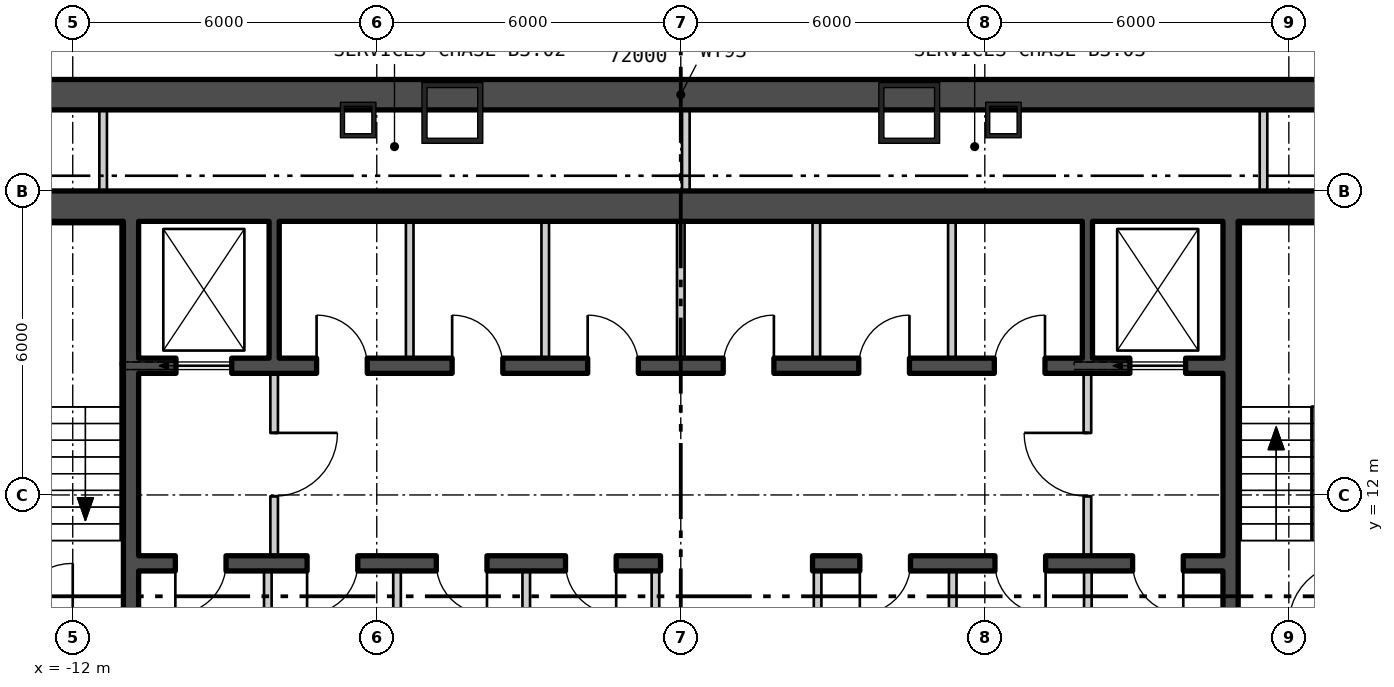
"""IFC4 building model, lengths in metres.
Left out: names, types, materials, properties, quantities, classifications, styles, units other than length and angle.
Written with IfcOpenShell. Run it as: python <this file> out.ifc"""

import sys

from ifc_helpers import new_model, si_unit, direction, frame, frame_2d, origin, origin_2d, place, context, subcontext, project, spatial, rectangle, hollow_rectangle, extrude, element, fill, save


model = new_model("IFC4")
c1 = context("Model", 3, precision=1e-05, world=origin(), true_north=direction((0.0, 1.0)))
c2 = subcontext(c1, "Body", "Model", "MODEL_VIEW")
j1 = project(units=[si_unit("LENGTHUNIT", "METRE"), si_unit("PLANEANGLEUNIT", "RADIAN")], contexts=[c1])
p1 = place(None, origin())
s1 = spatial("IfcSite", under=j1, at=p1, CompositionType="ELEMENT")
p2 = place(p1, origin())
s2 = spatial("IfcBuilding", under=s1, at=p2, CompositionType="ELEMENT")
p3 = place(p2, frame((0.0, 0.0, -16.8)))
s3 = spatial("IfcBuildingStorey", under=s2, at=p3, CompositionType="ELEMENT", Elevation=-16.8)
for number, where, z_axis, x_axis in (
    (1, (4.508, 19.54, 0.0), (0.0, 0.0, 1.0), (-1.0, 0.0, 0.0)),
    (2, (-4.508, 19.54, 0.0), (0.0, 0.0, 1.0), (-1.0, 0.0, 0.0)),
):
    element("IfcColumn", number, at=place(p3, frame(where, z_axis=z_axis, x_axis=x_axis)), inside=s3, PredefinedType="COLUMN", context=c2, shape_type="SweptSolid", body=[
        extrude(hollow_rectangle(XDim=1.2, YDim=1.2, WallThickness=0.1, at=origin_2d()), origin(), (0.0, 0.0, 1.0), 5.4),
    ])
for number, where, z_axis, x_axis in (
    (3, (6.367, 19.4, 0.0), (0.0, 0.0, 1.0), (-1.0, 0.0, 0.0)),
    (4, (-6.367, 19.4, 0.0), (0.0, 0.0, 1.0), (-1.0, 0.0, 0.0)),
):
    element("IfcColumn", number, at=place(p3, frame(where, z_axis=z_axis, x_axis=x_axis)), inside=s3, PredefinedType="COLUMN", context=c2, shape_type="SweptSolid", body=[
        extrude(hollow_rectangle(XDim=0.7, YDim=0.7, WallThickness=0.08, at=origin_2d()), origin(), (0.0, 0.0, 1.0), 5.4),
    ])
p4 = place(p3, frame((-39.0, 19.9, -0.4), z_axis=(0.0, 0.0, 1.0), x_axis=(1.0, 0.0, 0.0)))
e5 = element("IfcWall", 5, at=p4, inside=s3, PredefinedType="STANDARD", context=c2, shape_type="SweptSolid", body=[
    extrude(rectangle(XDim=78.0, YDim=0.6, at=frame_2d((39.0, 0.0))), origin(), (0.0, 0.0, 1.0), 5.4),
])
p5 = place(p3, frame((-17.5, 17.7, 0.0), z_axis=(0.0, 0.0, 1.0), x_axis=(1.0, 0.0, 0.0)))
e6 = element("IfcWall", 6, at=p5, inside=s3, PredefinedType="SHEAR", context=c2, shape_type="SweptSolid", body=[
    extrude(rectangle(XDim=35.0, YDim=0.6, at=frame_2d((17.5, 0.0))), origin(), (0.0, 0.0, 1.0), 4.95),
])
p6 = place(p3, frame((-10.85, 0.6, 0.0), z_axis=(0.0, 0.0, 1.0), x_axis=(0.0, 1.0, 0.0)))
e7 = element("IfcWall", 7, at=p6, inside=s3, PredefinedType="SHEAR", context=c2, shape_type="SweptSolid", body=[
    extrude(rectangle(XDim=16.8, YDim=0.3, at=frame_2d((8.4, 0.0))), origin(), (0.0, 0.0, 1.0), 4.95),
])
p7 = place(p6, frame((5.075, 0.0, 0.0)))
e8 = element("IfcOpeningElement", 8, at=p7, cuts=e7, PredefinedType="OPENING", context=c2, shape_type="SweptSolid", body=[
    extrude(rectangle(XDim=1.25, YDim=2.1, at=frame_2d((0.625, 1.05))), frame((0.0, 0.16, 0.0), z_axis=(0.0, -1.0, 0.0), x_axis=(1.0, 0.0, 0.0)), (0.0, 0.0, 1.0), 0.32),
])
p8 = place(p6, frame((1.525, 0.0, 0.0)))
e9 = element("IfcOpeningElement", 9, at=p8, cuts=e7, PredefinedType="OPENING", context=c2, shape_type="SweptSolid", body=[
    extrude(rectangle(XDim=1.0, YDim=2.1, at=frame_2d((0.5, 1.05))), frame((0.0, 0.16, 0.0), z_axis=(0.0, -1.0, 0.0), x_axis=(1.0, 0.0, 0.0)), (0.0, 0.0, 1.0), 0.32),
])
p9 = place(p3, frame((10.85, 0.6, 0.0), z_axis=(0.0, 0.0, 1.0), x_axis=(0.0, 1.0, 0.0)))
e10 = element("IfcWall", 10, at=p9, inside=s3, PredefinedType="SHEAR", context=c2, shape_type="SweptSolid", body=[
    extrude(rectangle(XDim=16.8, YDim=0.3, at=frame_2d((8.4, 0.0))), origin(), (0.0, 0.0, 1.0), 4.95),
])
p10 = place(p9, frame((5.075, 0.0, 0.0)))
e11 = element("IfcOpeningElement", 11, at=p10, cuts=e10, PredefinedType="OPENING", context=c2, shape_type="SweptSolid", body=[
    extrude(rectangle(XDim=1.25, YDim=2.1, at=frame_2d((0.625, 1.05))), frame((0.0, 0.16, 0.0), z_axis=(0.0, -1.0, 0.0), x_axis=(1.0, 0.0, 0.0)), (0.0, 0.0, 1.0), 0.32),
])
p11 = place(p9, frame((1.525, 0.0, 0.0)))
e12 = element("IfcOpeningElement", 12, at=p11, cuts=e10, PredefinedType="OPENING", context=c2, shape_type="SweptSolid", body=[
    extrude(rectangle(XDim=1.0, YDim=2.1, at=frame_2d((0.5, 1.05))), frame((0.0, 0.16, 0.0), z_axis=(0.0, -1.0, 0.0), x_axis=(1.0, 0.0, 0.0)), (0.0, 0.0, 1.0), 0.32),
])
p12 = place(p3, frame((-10.7, 14.55, 0.0), z_axis=(0.0, 0.0, 1.0), x_axis=(1.0, 0.0, 0.0)))
e13 = element("IfcWall", 13, at=p12, inside=s3, PredefinedType="SHEAR", context=c2, shape_type="SweptSolid", body=[
    extrude(rectangle(XDim=21.4, YDim=0.3, at=frame_2d((10.7, 0.0))), origin(), (0.0, 0.0, 1.0), 4.95),
])
p13 = place(p12, frame((0.738, 0.0, 0.0)))
e14 = element("IfcOpeningElement", 14, at=p13, cuts=e13, PredefinedType="OPENING", context=c2, shape_type="SweptSolid", body=[
    extrude(rectangle(XDim=1.1, YDim=2.1, at=frame_2d((0.55, 1.05))), frame((0.0, 0.16, 0.0), z_axis=(0.0, -1.0, 0.0), x_axis=(1.0, 0.0, 0.0)), (0.0, 0.0, 1.0), 0.32),
])
p14 = place(p12, frame((19.562, 0.0, 0.0)))
e15 = element("IfcOpeningElement", 15, at=p14, cuts=e13, PredefinedType="OPENING", context=c2, shape_type="SweptSolid", body=[
    extrude(rectangle(XDim=1.1, YDim=2.1, at=frame_2d((0.55, 1.05))), frame((0.0, 0.16, 0.0), z_axis=(0.0, -1.0, 0.0), x_axis=(1.0, 0.0, 0.0)), (0.0, 0.0, 1.0), 0.32),
])
p15 = place(p12, frame((3.513, 0.0, 0.0)))
e16 = element("IfcOpeningElement", 16, at=p15, cuts=e13, PredefinedType="OPENING", context=c2, shape_type="SweptSolid", body=[
    extrude(rectangle(XDim=1.0, YDim=2.1, at=frame_2d((0.5, 1.05))), frame((0.0, 0.16, 0.0), z_axis=(0.0, -1.0, 0.0), x_axis=(1.0, 0.0, 0.0)), (0.0, 0.0, 1.0), 0.32),
])
p16 = place(p12, frame((6.188, 0.0, 0.0)))
e17 = element("IfcOpeningElement", 17, at=p16, cuts=e13, PredefinedType="OPENING", context=c2, shape_type="SweptSolid", body=[
    extrude(rectangle(XDim=1.0, YDim=2.1, at=frame_2d((0.5, 1.05))), frame((0.0, 0.16, 0.0), z_axis=(0.0, -1.0, 0.0), x_axis=(1.0, 0.0, 0.0)), (0.0, 0.0, 1.0), 0.32),
])
p17 = place(p12, frame((8.863, 0.0, 0.0)))
e18 = element("IfcOpeningElement", 18, at=p17, cuts=e13, PredefinedType="OPENING", context=c2, shape_type="SweptSolid", body=[
    extrude(rectangle(XDim=1.0, YDim=2.1, at=frame_2d((0.5, 1.05))), frame((0.0, 0.16, 0.0), z_axis=(0.0, -1.0, 0.0), x_axis=(1.0, 0.0, 0.0)), (0.0, 0.0, 1.0), 0.32),
])
p18 = place(p12, frame((11.537, 0.0, 0.0)))
e19 = element("IfcOpeningElement", 19, at=p18, cuts=e13, PredefinedType="OPENING", context=c2, shape_type="SweptSolid", body=[
    extrude(rectangle(XDim=1.0, YDim=2.1, at=frame_2d((0.5, 1.05))), frame((0.0, 0.16, 0.0), z_axis=(0.0, -1.0, 0.0), x_axis=(1.0, 0.0, 0.0)), (0.0, 0.0, 1.0), 0.32),
])
p19 = place(p12, frame((14.213, 0.0, 0.0)))
e20 = element("IfcOpeningElement", 20, at=p19, cuts=e13, PredefinedType="OPENING", context=c2, shape_type="SweptSolid", body=[
    extrude(rectangle(XDim=1.0, YDim=2.1, at=frame_2d((0.5, 1.05))), frame((0.0, 0.16, 0.0), z_axis=(0.0, -1.0, 0.0), x_axis=(1.0, 0.0, 0.0)), (0.0, 0.0, 1.0), 0.32),
])
p20 = place(p12, frame((16.887, 0.0, 0.0)))
e21 = element("IfcOpeningElement", 21, at=p20, cuts=e13, PredefinedType="OPENING", context=c2, shape_type="SweptSolid", body=[
    extrude(rectangle(XDim=1.0, YDim=2.1, at=frame_2d((0.5, 1.05))), frame((0.0, 0.16, 0.0), z_axis=(0.0, -1.0, 0.0), x_axis=(1.0, 0.0, 0.0)), (0.0, 0.0, 1.0), 0.32),
])
p21 = place(p3, frame((-10.7, 10.65, 0.0), z_axis=(0.0, 0.0, 1.0), x_axis=(1.0, 0.0, 0.0)))
e22 = element("IfcWall", 22, at=p21, inside=s3, PredefinedType="SHEAR", context=c2, shape_type="SweptSolid", body=[
    extrude(rectangle(XDim=10.3, YDim=0.3, at=frame_2d((5.15, 0.0))), origin(), (0.0, 0.0, 1.0), 4.95),
])
p22 = place(p21, frame((0.725, 0.0, 0.0)))
e23 = element("IfcOpeningElement", 23, at=p22, cuts=e22, PredefinedType="OPENING", context=c2, shape_type="SweptSolid", body=[
    extrude(rectangle(XDim=1.0, YDim=2.1, at=frame_2d((0.5, 1.05))), frame((0.0, 0.16, 0.0), z_axis=(0.0, -1.0, 0.0), x_axis=(1.0, 0.0, 0.0)), (0.0, 0.0, 1.0), 0.32),
])
p23 = place(p21, frame((3.325, 0.0, 0.0)))
e24 = element("IfcOpeningElement", 24, at=p23, cuts=e22, PredefinedType="OPENING", context=c2, shape_type="SweptSolid", body=[
    extrude(rectangle(XDim=1.0, YDim=2.1, at=frame_2d((0.5, 1.05))), frame((0.0, 0.16, 0.0), z_axis=(0.0, -1.0, 0.0), x_axis=(1.0, 0.0, 0.0)), (0.0, 0.0, 1.0), 0.32),
])
p24 = place(p21, frame((5.875, 0.0, 0.0)))
e25 = element("IfcOpeningElement", 25, at=p24, cuts=e22, PredefinedType="OPENING", context=c2, shape_type="SweptSolid", body=[
    extrude(rectangle(XDim=1.0, YDim=2.1, at=frame_2d((0.5, 1.05))), frame((0.0, 0.16, 0.0), z_axis=(0.0, -1.0, 0.0), x_axis=(1.0, 0.0, 0.0)), (0.0, 0.0, 1.0), 0.32),
])
p25 = place(p21, frame((8.425, 0.0, 0.0)))
e26 = element("IfcOpeningElement", 26, at=p25, cuts=e22, PredefinedType="OPENING", context=c2, shape_type="SweptSolid", body=[
    extrude(rectangle(XDim=1.0, YDim=2.1, at=frame_2d((0.5, 1.05))), frame((0.0, 0.16, 0.0), z_axis=(0.0, -1.0, 0.0), x_axis=(1.0, 0.0, 0.0)), (0.0, 0.0, 1.0), 0.32),
])
p26 = place(p3, frame((2.6, 10.65, 0.0), z_axis=(0.0, 0.0, 1.0), x_axis=(1.0, 0.0, 0.0)))
e27 = element("IfcWall", 27, at=p26, inside=s3, PredefinedType="SHEAR", context=c2, shape_type="SweptSolid", body=[
    extrude(rectangle(XDim=8.1, YDim=0.3, at=frame_2d((4.05, 0.0))), origin(), (0.0, 0.0, 1.0), 4.95),
])
p27 = place(p26, frame((0.933, 0.0, 0.0)))
e28 = element("IfcOpeningElement", 28, at=p27, cuts=e27, PredefinedType="OPENING", context=c2, shape_type="SweptSolid", body=[
    extrude(rectangle(XDim=1.0, YDim=2.1, at=frame_2d((0.5, 1.05))), frame((0.0, 0.16, 0.0), z_axis=(0.0, -1.0, 0.0), x_axis=(1.0, 0.0, 0.0)), (0.0, 0.0, 1.0), 0.32),
])
p28 = place(p26, frame((3.6, 0.0, 0.0)))
e29 = element("IfcOpeningElement", 29, at=p28, cuts=e27, PredefinedType="OPENING", context=c2, shape_type="SweptSolid", body=[
    extrude(rectangle(XDim=1.0, YDim=2.1, at=frame_2d((0.5, 1.05))), frame((0.0, 0.16, 0.0), z_axis=(0.0, -1.0, 0.0), x_axis=(1.0, 0.0, 0.0)), (0.0, 0.0, 1.0), 0.32),
])
p29 = place(p26, frame((6.317, 0.0, 0.0)))
e30 = element("IfcOpeningElement", 30, at=p29, cuts=e27, PredefinedType="OPENING", context=c2, shape_type="SweptSolid", body=[
    extrude(rectangle(XDim=1.0, YDim=2.1, at=frame_2d((0.5, 1.05))), frame((0.0, 0.16, 0.0), z_axis=(0.0, -1.0, 0.0), x_axis=(1.0, 0.0, 0.0)), (0.0, 0.0, 1.0), 0.32),
])
p30 = place(p3, frame((-8.025, 14.7, 0.0), z_axis=(0.0, 0.0, 1.0), x_axis=(0.0, 1.0, 0.0)))
e31 = element("IfcWall", 31, at=p30, inside=s3, PredefinedType="SHEAR", context=c2, shape_type="SweptSolid", body=[
    extrude(rectangle(XDim=2.7, YDim=0.2, at=frame_2d((1.35, 0.0))), origin(), (0.0, 0.0, 1.0), 4.95),
])
for number, where, z_axis, x_axis in (
    (32, (-5.35, 14.7, 0.0), (0.0, 0.0, 1.0), (0.0, 1.0, 0.0)),
    (33, (-2.675, 14.7, 0.0), (0.0, 0.0, 1.0), (0.0, 1.0, 0.0)),
    (34, (0.0, 14.7, 0.0), (0.0, 0.0, 1.0), (0.0, 1.0, 0.0)),
    (35, (2.675, 14.7, 0.0), (0.0, 0.0, 1.0), (0.0, 1.0, 0.0)),
    (36, (5.35, 14.7, 0.0), (0.0, 0.0, 1.0), (0.0, 1.0, 0.0)),
):
    element("IfcWall", number, at=place(p3, frame(where, z_axis=z_axis, x_axis=x_axis)), inside=s3, PredefinedType="PARTITIONING", context=c2, shape_type="SweptSolid", body=[
        extrude(rectangle(XDim=2.7, YDim=0.15, at=frame_2d((1.35, 0.0))), origin(), (0.0, 0.0, 1.0), 4.95),
    ])
p31 = place(p3, frame((8.025, 14.7, 0.0), z_axis=(0.0, 0.0, 1.0), x_axis=(0.0, 1.0, 0.0)))
e37 = element("IfcWall", 37, at=p31, inside=s3, PredefinedType="SHEAR", context=c2, shape_type="SweptSolid", body=[
    extrude(rectangle(XDim=2.7, YDim=0.2, at=frame_2d((1.35, 0.0))), origin(), (0.0, 0.0, 1.0), 4.95),
])
for number, where, z_axis, x_axis in (
    (38, (-8.15, 7.8, 0.0), (0.0, 0.0, 1.0), (0.0, 1.0, 0.0)),
    (39, (-5.6, 7.8, 0.0), (0.0, 0.0, 1.0), (0.0, 1.0, 0.0)),
    (40, (-3.05, 7.8, 0.0), (0.0, 0.0, 1.0), (0.0, 1.0, 0.0)),
    (41, (-0.5, 7.8, 0.0), (0.0, 0.0, 1.0), (0.0, 1.0, 0.0)),
    (42, (2.7, 7.8, 0.0), (0.0, 0.0, 1.0), (0.0, 1.0, 0.0)),
    (43, (5.367, 7.8, 0.0), (0.0, 0.0, 1.0), (0.0, 1.0, 0.0)),
    (44, (8.033, 7.8, 0.0), (0.0, 0.0, 1.0), (0.0, 1.0, 0.0)),
):
    element("IfcWall", number, at=place(p3, frame(where, z_axis=z_axis, x_axis=x_axis)), inside=s3, PredefinedType="PARTITIONING", context=c2, shape_type="SweptSolid", body=[
        extrude(rectangle(XDim=2.7, YDim=0.15, at=frame_2d((1.35, 0.0))), origin(), (0.0, 0.0, 1.0), 4.95),
    ])
p32 = place(p3, frame((-8.025, 10.8, 0.0), z_axis=(0.0, 0.0, 1.0), x_axis=(0.0, 1.0, 0.0)))
e45 = element("IfcWall", 45, at=p32, inside=s3, PredefinedType="PARTITIONING", context=c2, shape_type="SweptSolid", body=[
    extrude(rectangle(XDim=3.6, YDim=0.15, at=frame_2d((1.8, 0.0))), origin(), (0.0, 0.0, 1.0), 4.95),
])
p33 = place(p32, frame((1.175, 0.0, 0.0)))
e46 = element("IfcOpeningElement", 46, at=p33, cuts=e45, PredefinedType="OPENING", context=c2, shape_type="SweptSolid", body=[
    extrude(rectangle(XDim=1.25, YDim=2.1, at=frame_2d((0.625, 1.05))), frame((0.0, 0.085, 0.0), z_axis=(0.0, -1.0, 0.0), x_axis=(1.0, 0.0, 0.0)), (0.0, 0.0, 1.0), 0.17),
])
p34 = place(p3, frame((8.025, 10.8, 0.0), z_axis=(0.0, 0.0, 1.0), x_axis=(0.0, 1.0, 0.0)))
e47 = element("IfcWall", 47, at=p34, inside=s3, PredefinedType="PARTITIONING", context=c2, shape_type="SweptSolid", body=[
    extrude(rectangle(XDim=3.6, YDim=0.15, at=frame_2d((1.8, 0.0))), origin(), (0.0, 0.0, 1.0), 4.95),
])
p35 = place(p34, frame((1.175, 0.0, 0.0)))
e48 = element("IfcOpeningElement", 48, at=p35, cuts=e47, PredefinedType="OPENING", context=c2, shape_type="SweptSolid", body=[
    extrude(rectangle(XDim=1.25, YDim=2.1, at=frame_2d((0.625, 1.05))), frame((0.0, 0.085, 0.0), z_axis=(0.0, -1.0, 0.0), x_axis=(1.0, 0.0, 0.0)), (0.0, 0.0, 1.0), 0.17),
])
for number, where, z_axis, x_axis in (
    (49, (-11.4, 18.0, 0.0), (0.0, 0.0, 1.0), (0.0, 1.0, 0.0)),
    (50, (0.1, 18.0, 0.0), (0.0, 0.0, 1.0), (0.0, 1.0, 0.0)),
    (51, (11.5, 18.0, 0.0), (0.0, 0.0, 1.0), (0.0, 1.0, 0.0)),
):
    element("IfcWall", number, at=place(p3, frame(where, z_axis=z_axis, x_axis=x_axis)), inside=s3, PredefinedType="PARTITIONING", context=c2, shape_type="SweptSolid", body=[
        extrude(rectangle(XDim=1.75, YDim=0.15, at=frame_2d((0.875, 0.0))), origin(), (0.0, 0.0, 1.0), 4.95),
    ])
p36 = place(p13, origin())
e52 = element("IfcDoor", 52, at=p36, inside=s3, OperationType="SLIDING_TO_LEFT", PredefinedType="DOOR", context=c2, shape_type="SweptSolid", body=[
    extrude(rectangle(XDim=1.1, YDim=2.1, at=frame_2d((0.55, 1.05))), frame((0.0, 0.025, 0.0), z_axis=(0.0, -1.0, 0.0), x_axis=(1.0, 0.0, 0.0)), (0.0, 0.0, 1.0), 0.05),
])
fill(e14, e52)
p37 = place(p14, origin())
e53 = element("IfcDoor", 53, at=p37, inside=s3, OperationType="SLIDING_TO_LEFT", PredefinedType="DOOR", context=c2, shape_type="SweptSolid", body=[
    extrude(rectangle(XDim=1.1, YDim=2.1, at=frame_2d((0.55, 1.05))), frame((0.0, 0.025, 0.0), z_axis=(0.0, -1.0, 0.0), x_axis=(1.0, 0.0, 0.0)), (0.0, 0.0, 1.0), 0.05),
])
fill(e15, e53)
p38 = place(p15, origin())
e54 = element("IfcDoor", 54, at=p38, inside=s3, OperationType="SINGLE_SWING_RIGHT", PredefinedType="DOOR", context=c2, shape_type="SweptSolid", body=[
    extrude(rectangle(XDim=1.0, YDim=2.1, at=frame_2d((0.5, 1.05))), frame((0.0, 0.025, 0.0), z_axis=(0.0, -1.0, 0.0), x_axis=(1.0, 0.0, 0.0)), (0.0, 0.0, 1.0), 0.05),
])
fill(e16, e54)
p39 = place(p16, origin())
e55 = element("IfcDoor", 55, at=p39, inside=s3, OperationType="SINGLE_SWING_RIGHT", PredefinedType="DOOR", context=c2, shape_type="SweptSolid", body=[
    extrude(rectangle(XDim=1.0, YDim=2.1, at=frame_2d((0.5, 1.05))), frame((0.0, 0.025, 0.0), z_axis=(0.0, -1.0, 0.0), x_axis=(1.0, 0.0, 0.0)), (0.0, 0.0, 1.0), 0.05),
])
fill(e17, e55)
p40 = place(p17, origin())
e56 = element("IfcDoor", 56, at=p40, inside=s3, OperationType="SINGLE_SWING_RIGHT", PredefinedType="DOOR", context=c2, shape_type="SweptSolid", body=[
    extrude(rectangle(XDim=1.0, YDim=2.1, at=frame_2d((0.5, 1.05))), frame((0.0, 0.025, 0.0), z_axis=(0.0, -1.0, 0.0), x_axis=(1.0, 0.0, 0.0)), (0.0, 0.0, 1.0), 0.05),
])
fill(e18, e56)
p41 = place(p18, origin())
e57 = element("IfcDoor", 57, at=p41, inside=s3, OperationType="SINGLE_SWING_LEFT", PredefinedType="DOOR", context=c2, shape_type="SweptSolid", body=[
    extrude(rectangle(XDim=1.0, YDim=2.1, at=frame_2d((0.5, 1.05))), frame((0.0, 0.025, 0.0), z_axis=(0.0, -1.0, 0.0), x_axis=(1.0, 0.0, 0.0)), (0.0, 0.0, 1.0), 0.05),
])
fill(e19, e57)
p42 = place(p19, origin())
e58 = element("IfcDoor", 58, at=p42, inside=s3, OperationType="SINGLE_SWING_LEFT", PredefinedType="DOOR", context=c2, shape_type="SweptSolid", body=[
    extrude(rectangle(XDim=1.0, YDim=2.1, at=frame_2d((0.5, 1.05))), frame((0.0, 0.025, 0.0), z_axis=(0.0, -1.0, 0.0), x_axis=(1.0, 0.0, 0.0)), (0.0, 0.0, 1.0), 0.05),
])
fill(e20, e58)
p43 = place(p20, origin())
e59 = element("IfcDoor", 59, at=p43, inside=s3, OperationType="SINGLE_SWING_LEFT", PredefinedType="DOOR", context=c2, shape_type="SweptSolid", body=[
    extrude(rectangle(XDim=1.0, YDim=2.1, at=frame_2d((0.5, 1.05))), frame((0.0, 0.025, 0.0), z_axis=(0.0, -1.0, 0.0), x_axis=(1.0, 0.0, 0.0)), (0.0, 0.0, 1.0), 0.05),
])
fill(e21, e59)
p44 = place(p22, origin())
e60 = element("IfcDoor", 60, at=p44, inside=s3, OperationType="SINGLE_SWING_LEFT", PredefinedType="DOOR", context=c2, shape_type="SweptSolid", body=[
    extrude(rectangle(XDim=1.0, YDim=2.1, at=frame_2d((0.5, 1.05))), frame((0.0, 0.025, 0.0), z_axis=(0.0, -1.0, 0.0), x_axis=(1.0, 0.0, 0.0)), (0.0, 0.0, 1.0), 0.05),
])
fill(e23, e60)
p45 = place(p23, origin())
e61 = element("IfcDoor", 61, at=p45, inside=s3, OperationType="SINGLE_SWING_LEFT", PredefinedType="DOOR", context=c2, shape_type="SweptSolid", body=[
    extrude(rectangle(XDim=1.0, YDim=2.1, at=frame_2d((0.5, 1.05))), frame((0.0, 0.025, 0.0), z_axis=(0.0, -1.0, 0.0), x_axis=(1.0, 0.0, 0.0)), (0.0, 0.0, 1.0), 0.05),
])
fill(e24, e61)
p46 = place(p24, origin())
e62 = element("IfcDoor", 62, at=p46, inside=s3, OperationType="SINGLE_SWING_RIGHT", PredefinedType="DOOR", context=c2, shape_type="SweptSolid", body=[
    extrude(rectangle(XDim=1.0, YDim=2.1, at=frame_2d((0.5, 1.05))), frame((0.0, 0.025, 0.0), z_axis=(0.0, -1.0, 0.0), x_axis=(1.0, 0.0, 0.0)), (0.0, 0.0, 1.0), 0.05),
])
fill(e25, e62)
p47 = place(p25, origin())
e63 = element("IfcDoor", 63, at=p47, inside=s3, OperationType="SINGLE_SWING_RIGHT", PredefinedType="DOOR", context=c2, shape_type="SweptSolid", body=[
    extrude(rectangle(XDim=1.0, YDim=2.1, at=frame_2d((0.5, 1.05))), frame((0.0, 0.025, 0.0), z_axis=(0.0, -1.0, 0.0), x_axis=(1.0, 0.0, 0.0)), (0.0, 0.0, 1.0), 0.05),
])
fill(e26, e63)
p48 = place(p27, origin())
e64 = element("IfcDoor", 64, at=p48, inside=s3, OperationType="SINGLE_SWING_LEFT", PredefinedType="DOOR", context=c2, shape_type="SweptSolid", body=[
    extrude(rectangle(XDim=1.0, YDim=2.1, at=frame_2d((0.5, 1.05))), frame((0.0, 0.025, 0.0), z_axis=(0.0, -1.0, 0.0), x_axis=(1.0, 0.0, 0.0)), (0.0, 0.0, 1.0), 0.05),
])
fill(e28, e64)
p49 = place(p28, origin())
e65 = element("IfcDoor", 65, at=p49, inside=s3, OperationType="SINGLE_SWING_RIGHT", PredefinedType="DOOR", context=c2, shape_type="SweptSolid", body=[
    extrude(rectangle(XDim=1.0, YDim=2.1, at=frame_2d((0.5, 1.05))), frame((0.0, 0.025, 0.0), z_axis=(0.0, -1.0, 0.0), x_axis=(1.0, 0.0, 0.0)), (0.0, 0.0, 1.0), 0.05),
])
fill(e29, e65)
p50 = place(p29, origin())
e66 = element("IfcDoor", 66, at=p50, inside=s3, OperationType="SINGLE_SWING_RIGHT", PredefinedType="DOOR", context=c2, shape_type="SweptSolid", body=[
    extrude(rectangle(XDim=1.0, YDim=2.1, at=frame_2d((0.5, 1.05))), frame((0.0, 0.025, 0.0), z_axis=(0.0, -1.0, 0.0), x_axis=(1.0, 0.0, 0.0)), (0.0, 0.0, 1.0), 0.05),
])
fill(e30, e66)
p51 = place(p33, origin())
e67 = element("IfcDoor", 67, at=p51, inside=s3, OperationType="SINGLE_SWING_RIGHT", PredefinedType="DOOR", context=c2, shape_type="SweptSolid", body=[
    extrude(rectangle(XDim=1.25, YDim=2.1, at=frame_2d((0.625, 1.05))), frame((0.0, 0.025, 0.0), z_axis=(0.0, -1.0, 0.0), x_axis=(1.0, 0.0, 0.0)), (0.0, 0.0, 1.0), 0.05),
])
fill(e46, e67)
p52 = place(p35, origin())
e68 = element("IfcDoor", 68, at=p52, inside=s3, OperationType="SINGLE_SWING_LEFT", PredefinedType="DOOR", context=c2, shape_type="SweptSolid", body=[
    extrude(rectangle(XDim=1.25, YDim=2.1, at=frame_2d((0.625, 1.05))), frame((0.0, 0.025, 0.0), z_axis=(0.0, -1.0, 0.0), x_axis=(1.0, 0.0, 0.0)), (0.0, 0.0, 1.0), 0.05),
])
fill(e48, e68)
save(model, sys.argv[1])
